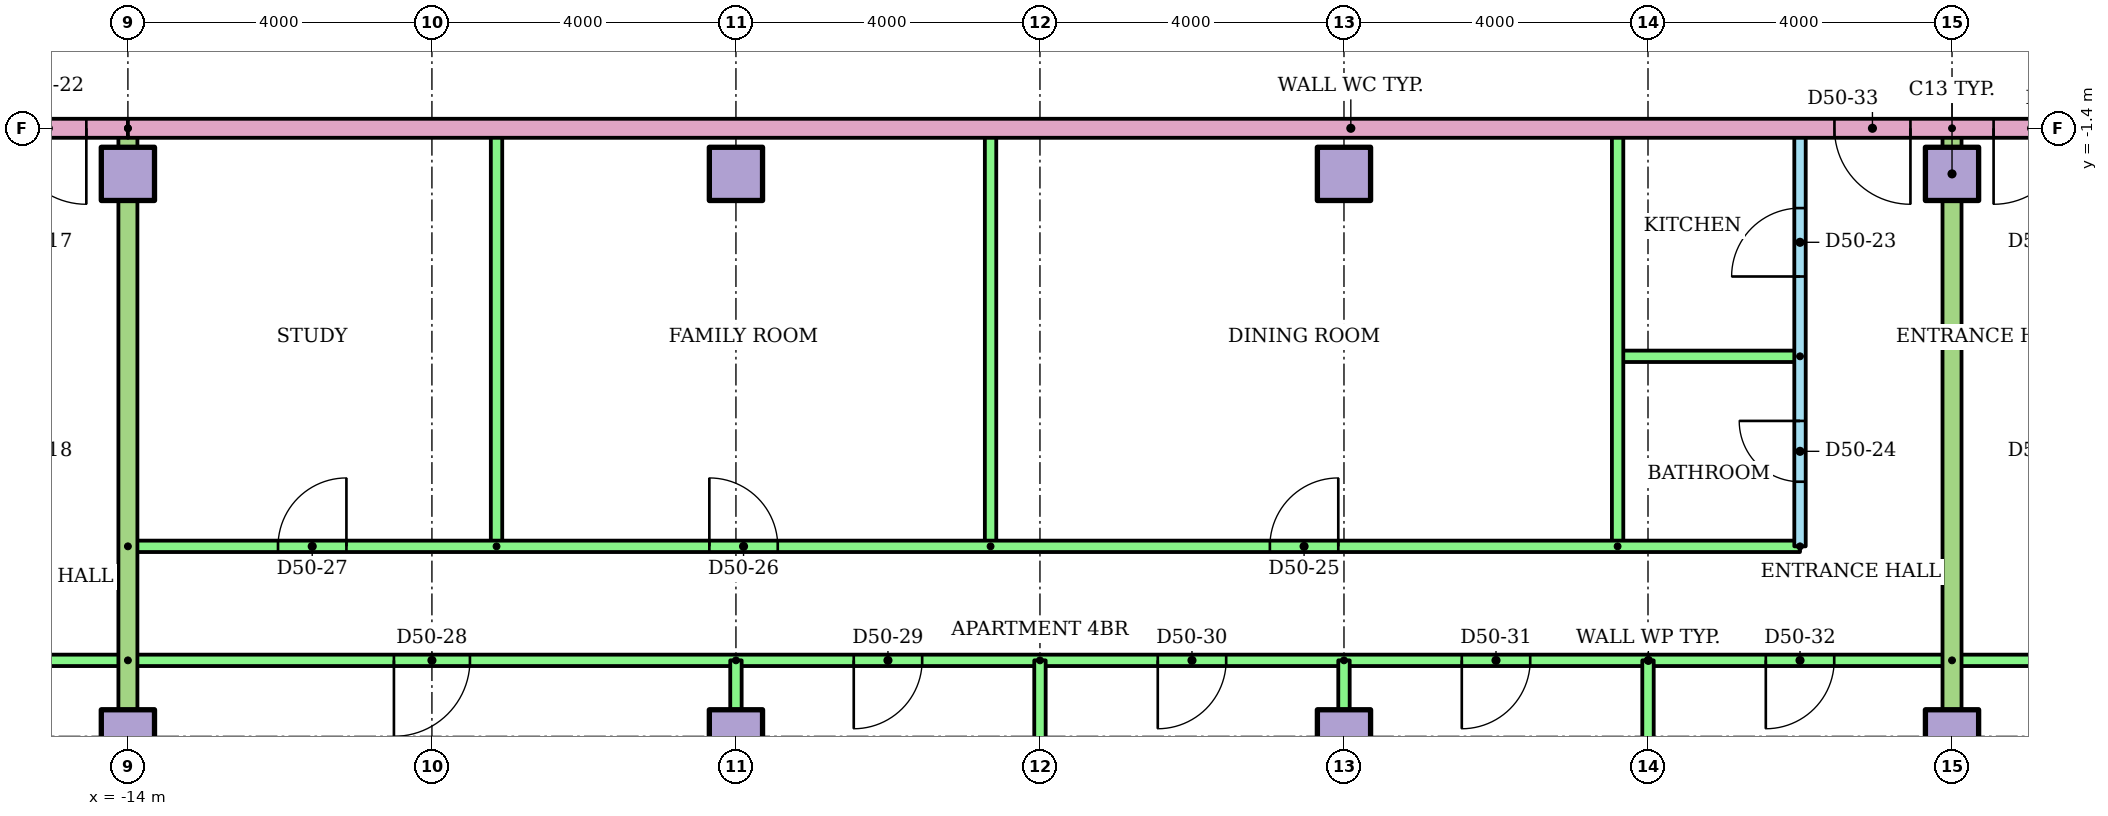
"""IFC4 building model, lengths in metres.
Left out: names, types, materials, properties, quantities, classifications, styles, units other than length and angle.
Written with IfcOpenShell. Run it as: python <this file> out.ifc"""

import sys

from ifc_helpers import new_model, si_unit, direction, frame, frame_2d, origin, origin_2d, place, context, subcontext, project, spatial, rectangle, extrude, element, fill, save


model = new_model("IFC4")
c1 = context("Model", 3, precision=1e-05, world=origin(), true_north=direction((0.0, 1.0)))
c2 = subcontext(c1, "Body", "Model", "MODEL_VIEW")
j1 = project(units=[si_unit("LENGTHUNIT", "METRE"), si_unit("PLANEANGLEUNIT", "RADIAN")], contexts=[c1])
p1 = place(None, origin())
s1 = spatial("IfcSite", under=j1, at=p1, CompositionType="ELEMENT")
p2 = place(p1, origin())
s2 = spatial("IfcBuilding", under=s1, at=p2, CompositionType="ELEMENT")
p3 = place(p2, frame((0.0, 0.0, 190.9)))
s3 = spatial("IfcBuildingStorey", under=s2, at=p3, CompositionType="ELEMENT", Elevation=190.9)
for number, where in (
    (1, (-14.0, -9.4, 0.0)),
    (2, (-6.0, -9.4, 0.0)),
    (3, (2.0, -9.4, 0.0)),
    (4, (10.0, -9.4, 0.0)),
    (5, (-14.0, -2.0, 0.0)),
    (6, (-6.0, -2.0, 0.0)),
    (7, (2.0, -2.0, 0.0)),
    (8, (10.0, -2.0, 0.0)),
):
    element("IfcColumn", number, at=place(p3, frame(where)), inside=s3, PredefinedType="COLUMN", context=c2, shape_type="SweptSolid", body=[
        extrude(rectangle(XDim=0.7, YDim=0.7, at=origin_2d()), origin(), (0.0, 0.0, 1.0), 3.2),
    ])
p4 = place(p3, frame((-14.0, -8.4, 0.0), z_axis=(0.0, 0.0, 1.0), x_axis=(-1.0, 0.0, 0.0)))
e9 = element("IfcWall", 9, at=p4, inside=s3, PredefinedType="PARTITIONING", context=c2, shape_type="SweptSolid", body=[
    extrude(rectangle(XDim=10.81, YDim=0.15, at=frame_2d((5.405, 0.0))), origin(), (0.0, 0.0, 1.0), 2.4),
])
p5 = place(p4, frame((8.547, 0.0, 0.0)))
e10 = element("IfcOpeningElement", 10, at=p5, cuts=e9, PredefinedType="OPENING", context=c2, shape_type="SweptSolid", body=[
    extrude(rectangle(XDim=0.9, YDim=2.1, at=frame_2d((0.45, 1.05))), frame((0.0, 0.085, 0.0), z_axis=(0.0, -1.0, 0.0), x_axis=(1.0, 0.0, 0.0)), (0.0, 0.0, 1.0), 0.17),
])
p6 = place(p4, frame((2.55, 0.0, 0.0)))
e11 = element("IfcOpeningElement", 11, at=p6, cuts=e9, PredefinedType="OPENING", context=c2, shape_type="SweptSolid", body=[
    extrude(rectangle(XDim=1.0, YDim=2.1, at=frame_2d((0.5, 1.05))), frame((0.0, 0.085, 0.0), z_axis=(0.0, -1.0, 0.0), x_axis=(1.0, 0.0, 0.0)), (0.0, 0.0, 1.0), 0.17),
])
p7 = place(p3, frame((8.0, -6.9, 0.0), z_axis=(0.0, 0.0, 1.0), x_axis=(0.0, 1.0, 0.0)))
e12 = element("IfcWall", 12, at=p7, inside=s3, PredefinedType="PARTITIONING", context=c2, shape_type="SweptSolid", body=[
    extrude(rectangle(XDim=5.5, YDim=0.15, at=frame_2d((2.75, 0.0))), origin(), (0.0, 0.0, 1.0), 2.4),
])
p8 = place(p7, frame((3.55, 0.0, 0.0)))
e13 = element("IfcOpeningElement", 13, at=p8, cuts=e12, PredefinedType="OPENING", context=c2, shape_type="SweptSolid", body=[
    extrude(rectangle(XDim=0.9, YDim=2.1, at=frame_2d((0.45, 1.05))), frame((0.0, 0.085, 0.0), z_axis=(0.0, -1.0, 0.0), x_axis=(1.0, 0.0, 0.0)), (0.0, 0.0, 1.0), 0.17),
])
p9 = place(p7, frame((0.85, 0.0, 0.0)))
e14 = element("IfcOpeningElement", 14, at=p9, cuts=e12, PredefinedType="OPENING", context=c2, shape_type="SweptSolid", body=[
    extrude(rectangle(XDim=0.8, YDim=2.1, at=frame_2d((0.4, 1.05))), frame((0.0, 0.085, 0.0), z_axis=(0.0, -1.0, 0.0), x_axis=(1.0, 0.0, 0.0)), (0.0, 0.0, 1.0), 0.17),
])
p10 = place(p3, frame((8.0, -4.4, 0.0), z_axis=(0.0, 0.0, 1.0), x_axis=(-1.0, 0.0, 0.0)))
e15 = element("IfcWall", 15, at=p10, inside=s3, PredefinedType="PARTITIONING", context=c2, shape_type="SweptSolid", body=[
    extrude(rectangle(XDim=2.4, YDim=0.15, at=frame_2d((1.2, 0.0))), origin(), (0.0, 0.0, 1.0), 2.4),
])
for number, where, z_axis, x_axis in (
    (16, (5.6, -6.9, 0.0), (0.0, 0.0, 1.0), (0.0, 1.0, 0.0)),
    (17, (-2.65, -6.9, 0.0), (0.0, 0.0, 1.0), (0.0, 1.0, 0.0)),
    (18, (-9.15, -6.9, 0.0), (0.0, 0.0, 1.0), (0.0, 1.0, 0.0)),
):
    element("IfcWall", number, at=place(p3, frame(where, z_axis=z_axis, x_axis=x_axis)), inside=s3, PredefinedType="PARTITIONING", context=c2, shape_type="SweptSolid", body=[
        extrude(rectangle(XDim=5.5, YDim=0.15, at=frame_2d((2.75, 0.0))), origin(), (0.0, 0.0, 1.0), 2.4),
    ])
p11 = place(p3, frame((-14.0, -6.9, 0.0)))
e19 = element("IfcWall", 19, at=p11, inside=s3, PredefinedType="PARTITIONING", context=c2, shape_type="SweptSolid", body=[
    extrude(rectangle(XDim=22.0, YDim=0.15, at=frame_2d((11.0, 0.0))), origin(), (0.0, 0.0, 1.0), 2.4),
])
p12 = place(p11, frame((15.025, 0.0, 0.0)))
e20 = element("IfcOpeningElement", 20, at=p12, cuts=e19, PredefinedType="OPENING", context=c2, shape_type="SweptSolid", body=[
    extrude(rectangle(XDim=0.9, YDim=2.1, at=frame_2d((0.45, 1.05))), frame((0.0, 0.085, 0.0), z_axis=(0.0, -1.0, 0.0), x_axis=(1.0, 0.0, 0.0)), (0.0, 0.0, 1.0), 0.17),
])
p13 = place(p11, frame((7.65, 0.0, 0.0)))
e21 = element("IfcOpeningElement", 21, at=p13, cuts=e19, PredefinedType="OPENING", context=c2, shape_type="SweptSolid", body=[
    extrude(rectangle(XDim=0.9, YDim=2.1, at=frame_2d((0.45, 1.05))), frame((0.0, 0.085, 0.0), z_axis=(0.0, -1.0, 0.0), x_axis=(1.0, 0.0, 0.0)), (0.0, 0.0, 1.0), 0.17),
])
p14 = place(p11, frame((1.975, 0.0, 0.0)))
e22 = element("IfcOpeningElement", 22, at=p14, cuts=e19, PredefinedType="OPENING", context=c2, shape_type="SweptSolid", body=[
    extrude(rectangle(XDim=0.9, YDim=2.1, at=frame_2d((0.45, 1.05))), frame((0.0, 0.085, 0.0), z_axis=(0.0, -1.0, 0.0), x_axis=(1.0, 0.0, 0.0)), (0.0, 0.0, 1.0), 0.17),
])
p15 = place(p3, frame((10.0, -8.4, 0.0), z_axis=(0.0, 0.0, 1.0), x_axis=(-1.0, 0.0, 0.0)))
e23 = element("IfcWall", 23, at=p15, inside=s3, PredefinedType="PARTITIONING", context=c2, shape_type="SweptSolid", body=[
    extrude(rectangle(XDim=24.0, YDim=0.15, at=frame_2d((12.0, 0.0))), origin(), (0.0, 0.0, 1.0), 2.4),
])
p16 = place(p15, frame((19.5, 0.0, 0.0)))
e24 = element("IfcOpeningElement", 24, at=p16, cuts=e23, PredefinedType="OPENING", context=c2, shape_type="SweptSolid", body=[
    extrude(rectangle(XDim=1.0, YDim=2.1, at=frame_2d((0.5, 1.05))), frame((0.0, 0.085, 0.0), z_axis=(0.0, -1.0, 0.0), x_axis=(1.0, 0.0, 0.0)), (0.0, 0.0, 1.0), 0.17),
])
p17 = place(p15, frame((13.55, 0.0, 0.0)))
e25 = element("IfcOpeningElement", 25, at=p17, cuts=e23, PredefinedType="OPENING", context=c2, shape_type="SweptSolid", body=[
    extrude(rectangle(XDim=0.9, YDim=2.1, at=frame_2d((0.45, 1.05))), frame((0.0, 0.085, 0.0), z_axis=(0.0, -1.0, 0.0), x_axis=(1.0, 0.0, 0.0)), (0.0, 0.0, 1.0), 0.17),
])
p18 = place(p15, frame((9.55, 0.0, 0.0)))
e26 = element("IfcOpeningElement", 26, at=p18, cuts=e23, PredefinedType="OPENING", context=c2, shape_type="SweptSolid", body=[
    extrude(rectangle(XDim=0.9, YDim=2.1, at=frame_2d((0.45, 1.05))), frame((0.0, 0.085, 0.0), z_axis=(0.0, -1.0, 0.0), x_axis=(1.0, 0.0, 0.0)), (0.0, 0.0, 1.0), 0.17),
])
p19 = place(p15, frame((5.55, 0.0, 0.0)))
e27 = element("IfcOpeningElement", 27, at=p19, cuts=e23, PredefinedType="OPENING", context=c2, shape_type="SweptSolid", body=[
    extrude(rectangle(XDim=0.9, YDim=2.1, at=frame_2d((0.45, 1.05))), frame((0.0, 0.085, 0.0), z_axis=(0.0, -1.0, 0.0), x_axis=(1.0, 0.0, 0.0)), (0.0, 0.0, 1.0), 0.17),
])
p20 = place(p15, frame((1.55, 0.0, 0.0)))
e28 = element("IfcOpeningElement", 28, at=p20, cuts=e23, PredefinedType="OPENING", context=c2, shape_type="SweptSolid", body=[
    extrude(rectangle(XDim=0.9, YDim=2.1, at=frame_2d((0.45, 1.05))), frame((0.0, 0.085, 0.0), z_axis=(0.0, -1.0, 0.0), x_axis=(1.0, 0.0, 0.0)), (0.0, 0.0, 1.0), 0.17),
])
p21 = place(p3, frame((-6.0, -8.4, 0.0), z_axis=(0.0, 0.0, 1.0), x_axis=(0.0, -1.0, 0.0)))
e29 = element("IfcWall", 29, at=p21, inside=s3, PredefinedType="PARTITIONING", context=c2, shape_type="SweptSolid", body=[
    extrude(rectangle(XDim=8.01, YDim=0.15, at=frame_2d((4.005, 0.0))), origin(), (0.0, 0.0, 1.0), 2.4),
])
p22 = place(p3, frame((-2.0, -8.4, 0.0), z_axis=(0.0, 0.0, 1.0), x_axis=(0.0, -1.0, 0.0)))
e30 = element("IfcWall", 30, at=p22, inside=s3, PredefinedType="PARTITIONING", context=c2, shape_type="SweptSolid", body=[
    extrude(rectangle(XDim=8.021, YDim=0.15, at=frame_2d((4.01, 0.0))), origin(), (0.0, 0.0, 1.0), 2.4),
])
p23 = place(p3, frame((2.0, -8.4, 0.0), z_axis=(0.0, 0.0, 1.0), x_axis=(0.0, -1.0, 0.0)))
e31 = element("IfcWall", 31, at=p23, inside=s3, PredefinedType="PARTITIONING", context=c2, shape_type="SweptSolid", body=[
    extrude(rectangle(XDim=8.01, YDim=0.15, at=frame_2d((4.005, 0.0))), origin(), (0.0, 0.0, 1.0), 2.4),
])
p24 = place(p3, frame((6.0, -8.4, 0.0), z_axis=(0.0, 0.0, 1.0), x_axis=(0.0, -1.0, 0.0)))
e32 = element("IfcWall", 32, at=p24, inside=s3, PredefinedType="PARTITIONING", context=c2, shape_type="SweptSolid", body=[
    extrude(rectangle(XDim=8.021, YDim=0.15, at=frame_2d((4.01, 0.0))), origin(), (0.0, 0.0, 1.0), 2.4),
])
p25 = place(p3, frame((-14.0, -1.4, 0.0), z_axis=(0.0, 0.0, 1.0), x_axis=(0.0, -1.0, 0.0)))
e33 = element("IfcWall", 33, at=p25, inside=s3, PredefinedType="PARTITIONING", context=c2, shape_type="SweptSolid", body=[
    extrude(rectangle(XDim=15.01, YDim=0.25, at=frame_2d((7.505, 0.0))), origin(), (0.0, 0.0, 1.0), 2.4),
])
p26 = place(p3, frame((18.0, -8.4, 0.0), z_axis=(0.0, 0.0, 1.0), x_axis=(-1.0, 0.0, 0.0)))
e34 = element("IfcWall", 34, at=p26, inside=s3, PredefinedType="PARTITIONING", context=c2, shape_type="SweptSolid", body=[
    extrude(rectangle(XDim=8.0, YDim=0.15, at=frame_2d((4.0, 0.0))), origin(), (0.0, 0.0, 1.0), 2.4),
])
p27 = place(p26, frame((5.5, 0.0, 0.0)))
e35 = element("IfcOpeningElement", 35, at=p27, cuts=e34, PredefinedType="OPENING", context=c2, shape_type="SweptSolid", body=[
    extrude(rectangle(XDim=1.0, YDim=2.1, at=frame_2d((0.5, 1.05))), frame((0.0, 0.085, 0.0), z_axis=(0.0, -1.0, 0.0), x_axis=(1.0, 0.0, 0.0)), (0.0, 0.0, 1.0), 0.17),
])
p28 = place(p26, frame((1.5, 0.0, 0.0)))
e36 = element("IfcOpeningElement", 36, at=p28, cuts=e34, PredefinedType="OPENING", context=c2, shape_type="SweptSolid", body=[
    extrude(rectangle(XDim=1.0, YDim=2.1, at=frame_2d((0.5, 1.05))), frame((0.0, 0.085, 0.0), z_axis=(0.0, -1.0, 0.0), x_axis=(1.0, 0.0, 0.0)), (0.0, 0.0, 1.0), 0.17),
])
p29 = place(p3, frame((10.0, -1.4, 0.0), z_axis=(0.0, 0.0, 1.0), x_axis=(0.0, -1.0, 0.0)))
e37 = element("IfcWall", 37, at=p29, inside=s3, PredefinedType="PARTITIONING", context=c2, shape_type="SweptSolid", body=[
    extrude(rectangle(XDim=15.01, YDim=0.25, at=frame_2d((7.505, 0.0))), origin(), (0.0, 0.0, 1.0), 2.4),
])
p30 = place(p3, frame((-14.0, -1.4, 0.0), z_axis=(0.0, 0.0, 1.0), x_axis=(-1.0, 0.0, 0.0)))
e38 = element("IfcWall", 38, at=p30, inside=s3, PredefinedType="PARTITIONING", context=c2, shape_type="SweptSolid", body=[
    extrude(rectangle(XDim=10.82, YDim=0.25, at=frame_2d((5.41, 0.0))), origin(), (0.0, 0.0, 1.0), 2.4),
])
p31 = place(p30, frame((0.547, 0.0, 0.0)))
e39 = element("IfcOpeningElement", 39, at=p31, cuts=e38, PredefinedType="OPENING", context=c2, shape_type="SweptSolid", body=[
    extrude(rectangle(XDim=1.0, YDim=2.1, at=frame_2d((0.5, 1.05))), frame((0.0, 0.135, 0.0), z_axis=(0.0, -1.0, 0.0), x_axis=(1.0, 0.0, 0.0)), (0.0, 0.0, 1.0), 0.27),
])
p32 = place(p3, frame((14.0, -1.4, 0.0), z_axis=(0.0, 0.0, 1.0), x_axis=(-1.0, 0.0, 0.0)))
e40 = element("IfcWall", 40, at=p32, inside=s3, PredefinedType="PARTITIONING", context=c2, shape_type="SweptSolid", body=[
    extrude(rectangle(XDim=28.0, YDim=0.25, at=frame_2d((14.0, 0.0))), origin(), (0.0, 0.0, 1.0), 2.4),
])
p33 = place(p32, frame((4.547, 0.0, 0.0)))
e41 = element("IfcOpeningElement", 41, at=p33, cuts=e40, PredefinedType="OPENING", context=c2, shape_type="SweptSolid", body=[
    extrude(rectangle(XDim=1.0, YDim=2.1, at=frame_2d((0.5, 1.05))), frame((0.0, 0.135, 0.0), z_axis=(0.0, -1.0, 0.0), x_axis=(1.0, 0.0, 0.0)), (0.0, 0.0, 1.0), 0.27),
])
p34 = place(p32, frame((2.453, 0.0, 0.0)))
e42 = element("IfcOpeningElement", 42, at=p34, cuts=e40, PredefinedType="OPENING", context=c2, shape_type="SweptSolid", body=[
    extrude(rectangle(XDim=1.0, YDim=2.1, at=frame_2d((0.5, 1.05))), frame((0.0, 0.135, 0.0), z_axis=(0.0, -1.0, 0.0), x_axis=(1.0, 0.0, 0.0)), (0.0, 0.0, 1.0), 0.27),
])
p35 = place(p31, origin())
e43 = element("IfcDoor", 43, at=p35, inside=s3, OperationType="SINGLE_SWING_LEFT", PredefinedType="DOOR", context=c2, shape_type="SweptSolid", body=[
    extrude(rectangle(XDim=1.0, YDim=2.1, at=frame_2d((0.5, 1.05))), frame((0.0, 0.025, 0.0), z_axis=(0.0, -1.0, 0.0), x_axis=(1.0, 0.0, 0.0)), (0.0, 0.0, 1.0), 0.05),
])
fill(e39, e43)
p36 = place(p8, origin())
e44 = element("IfcDoor", 44, at=p36, inside=s3, OperationType="SINGLE_SWING_LEFT", PredefinedType="DOOR", context=c2, shape_type="SweptSolid", body=[
    extrude(rectangle(XDim=0.9, YDim=2.1, at=frame_2d((0.45, 1.05))), frame((0.0, 0.025, 0.0), z_axis=(0.0, -1.0, 0.0), x_axis=(1.0, 0.0, 0.0)), (0.0, 0.0, 1.0), 0.05),
])
fill(e13, e44)
p37 = place(p9, origin())
e45 = element("IfcDoor", 45, at=p37, inside=s3, OperationType="SINGLE_SWING_RIGHT", PredefinedType="DOOR", context=c2, shape_type="SweptSolid", body=[
    extrude(rectangle(XDim=0.8, YDim=2.1, at=frame_2d((0.4, 1.05))), frame((0.0, 0.025, 0.0), z_axis=(0.0, -1.0, 0.0), x_axis=(1.0, 0.0, 0.0)), (0.0, 0.0, 1.0), 0.05),
])
fill(e14, e45)
p38 = place(p12, origin())
e46 = element("IfcDoor", 46, at=p38, inside=s3, OperationType="SINGLE_SWING_RIGHT", PredefinedType="DOOR", context=c2, shape_type="SweptSolid", body=[
    extrude(rectangle(XDim=0.9, YDim=2.1, at=frame_2d((0.45, 1.05))), frame((0.0, 0.025, 0.0), z_axis=(0.0, -1.0, 0.0), x_axis=(1.0, 0.0, 0.0)), (0.0, 0.0, 1.0), 0.05),
])
fill(e20, e46)
p39 = place(p13, origin())
e47 = element("IfcDoor", 47, at=p39, inside=s3, OperationType="SINGLE_SWING_LEFT", PredefinedType="DOOR", context=c2, shape_type="SweptSolid", body=[
    extrude(rectangle(XDim=0.9, YDim=2.1, at=frame_2d((0.45, 1.05))), frame((0.0, 0.025, 0.0), z_axis=(0.0, -1.0, 0.0), x_axis=(1.0, 0.0, 0.0)), (0.0, 0.0, 1.0), 0.05),
])
fill(e21, e47)
p40 = place(p14, origin())
e48 = element("IfcDoor", 48, at=p40, inside=s3, OperationType="SINGLE_SWING_RIGHT", PredefinedType="DOOR", context=c2, shape_type="SweptSolid", body=[
    extrude(rectangle(XDim=0.9, YDim=2.1, at=frame_2d((0.45, 1.05))), frame((0.0, 0.025, 0.0), z_axis=(0.0, -1.0, 0.0), x_axis=(1.0, 0.0, 0.0)), (0.0, 0.0, 1.0), 0.05),
])
fill(e22, e48)
p41 = place(p16, origin())
e49 = element("IfcDoor", 49, at=p41, inside=s3, OperationType="SINGLE_SWING_RIGHT", PredefinedType="DOOR", context=c2, shape_type="SweptSolid", body=[
    extrude(rectangle(XDim=1.0, YDim=2.1, at=frame_2d((0.5, 1.05))), frame((0.0, 0.025, 0.0), z_axis=(0.0, -1.0, 0.0), x_axis=(1.0, 0.0, 0.0)), (0.0, 0.0, 1.0), 0.05),
])
fill(e24, e49)
p42 = place(p17, origin())
e50 = element("IfcDoor", 50, at=p42, inside=s3, OperationType="SINGLE_SWING_RIGHT", PredefinedType="DOOR", context=c2, shape_type="SweptSolid", body=[
    extrude(rectangle(XDim=0.9, YDim=2.1, at=frame_2d((0.45, 1.05))), frame((0.0, 0.025, 0.0), z_axis=(0.0, -1.0, 0.0), x_axis=(1.0, 0.0, 0.0)), (0.0, 0.0, 1.0), 0.05),
])
fill(e25, e50)
p43 = place(p18, origin())
e51 = element("IfcDoor", 51, at=p43, inside=s3, OperationType="SINGLE_SWING_RIGHT", PredefinedType="DOOR", context=c2, shape_type="SweptSolid", body=[
    extrude(rectangle(XDim=0.9, YDim=2.1, at=frame_2d((0.45, 1.05))), frame((0.0, 0.025, 0.0), z_axis=(0.0, -1.0, 0.0), x_axis=(1.0, 0.0, 0.0)), (0.0, 0.0, 1.0), 0.05),
])
fill(e26, e51)
p44 = place(p19, origin())
e52 = element("IfcDoor", 52, at=p44, inside=s3, OperationType="SINGLE_SWING_RIGHT", PredefinedType="DOOR", context=c2, shape_type="SweptSolid", body=[
    extrude(rectangle(XDim=0.9, YDim=2.1, at=frame_2d((0.45, 1.05))), frame((0.0, 0.025, 0.0), z_axis=(0.0, -1.0, 0.0), x_axis=(1.0, 0.0, 0.0)), (0.0, 0.0, 1.0), 0.05),
])
fill(e27, e52)
p45 = place(p20, origin())
e53 = element("IfcDoor", 53, at=p45, inside=s3, OperationType="SINGLE_SWING_RIGHT", PredefinedType="DOOR", context=c2, shape_type="SweptSolid", body=[
    extrude(rectangle(XDim=0.9, YDim=2.1, at=frame_2d((0.45, 1.05))), frame((0.0, 0.025, 0.0), z_axis=(0.0, -1.0, 0.0), x_axis=(1.0, 0.0, 0.0)), (0.0, 0.0, 1.0), 0.05),
])
fill(e28, e53)
p46 = place(p33, origin())
e54 = element("IfcDoor", 54, at=p46, inside=s3, OperationType="SINGLE_SWING_LEFT", PredefinedType="DOOR", context=c2, shape_type="SweptSolid", body=[
    extrude(rectangle(XDim=1.0, YDim=2.1, at=frame_2d((0.5, 1.05))), frame((0.0, 0.025, 0.0), z_axis=(0.0, -1.0, 0.0), x_axis=(1.0, 0.0, 0.0)), (0.0, 0.0, 1.0), 0.05),
])
fill(e41, e54)
p47 = place(p34, origin())
e55 = element("IfcDoor", 55, at=p47, inside=s3, OperationType="SINGLE_SWING_RIGHT", PredefinedType="DOOR", context=c2, shape_type="SweptSolid", body=[
    extrude(rectangle(XDim=1.0, YDim=2.1, at=frame_2d((0.5, 1.05))), frame((0.0, 0.025, 0.0), z_axis=(0.0, -1.0, 0.0), x_axis=(1.0, 0.0, 0.0)), (0.0, 0.0, 1.0), 0.05),
])
fill(e42, e55)
save(model, sys.argv[1])
